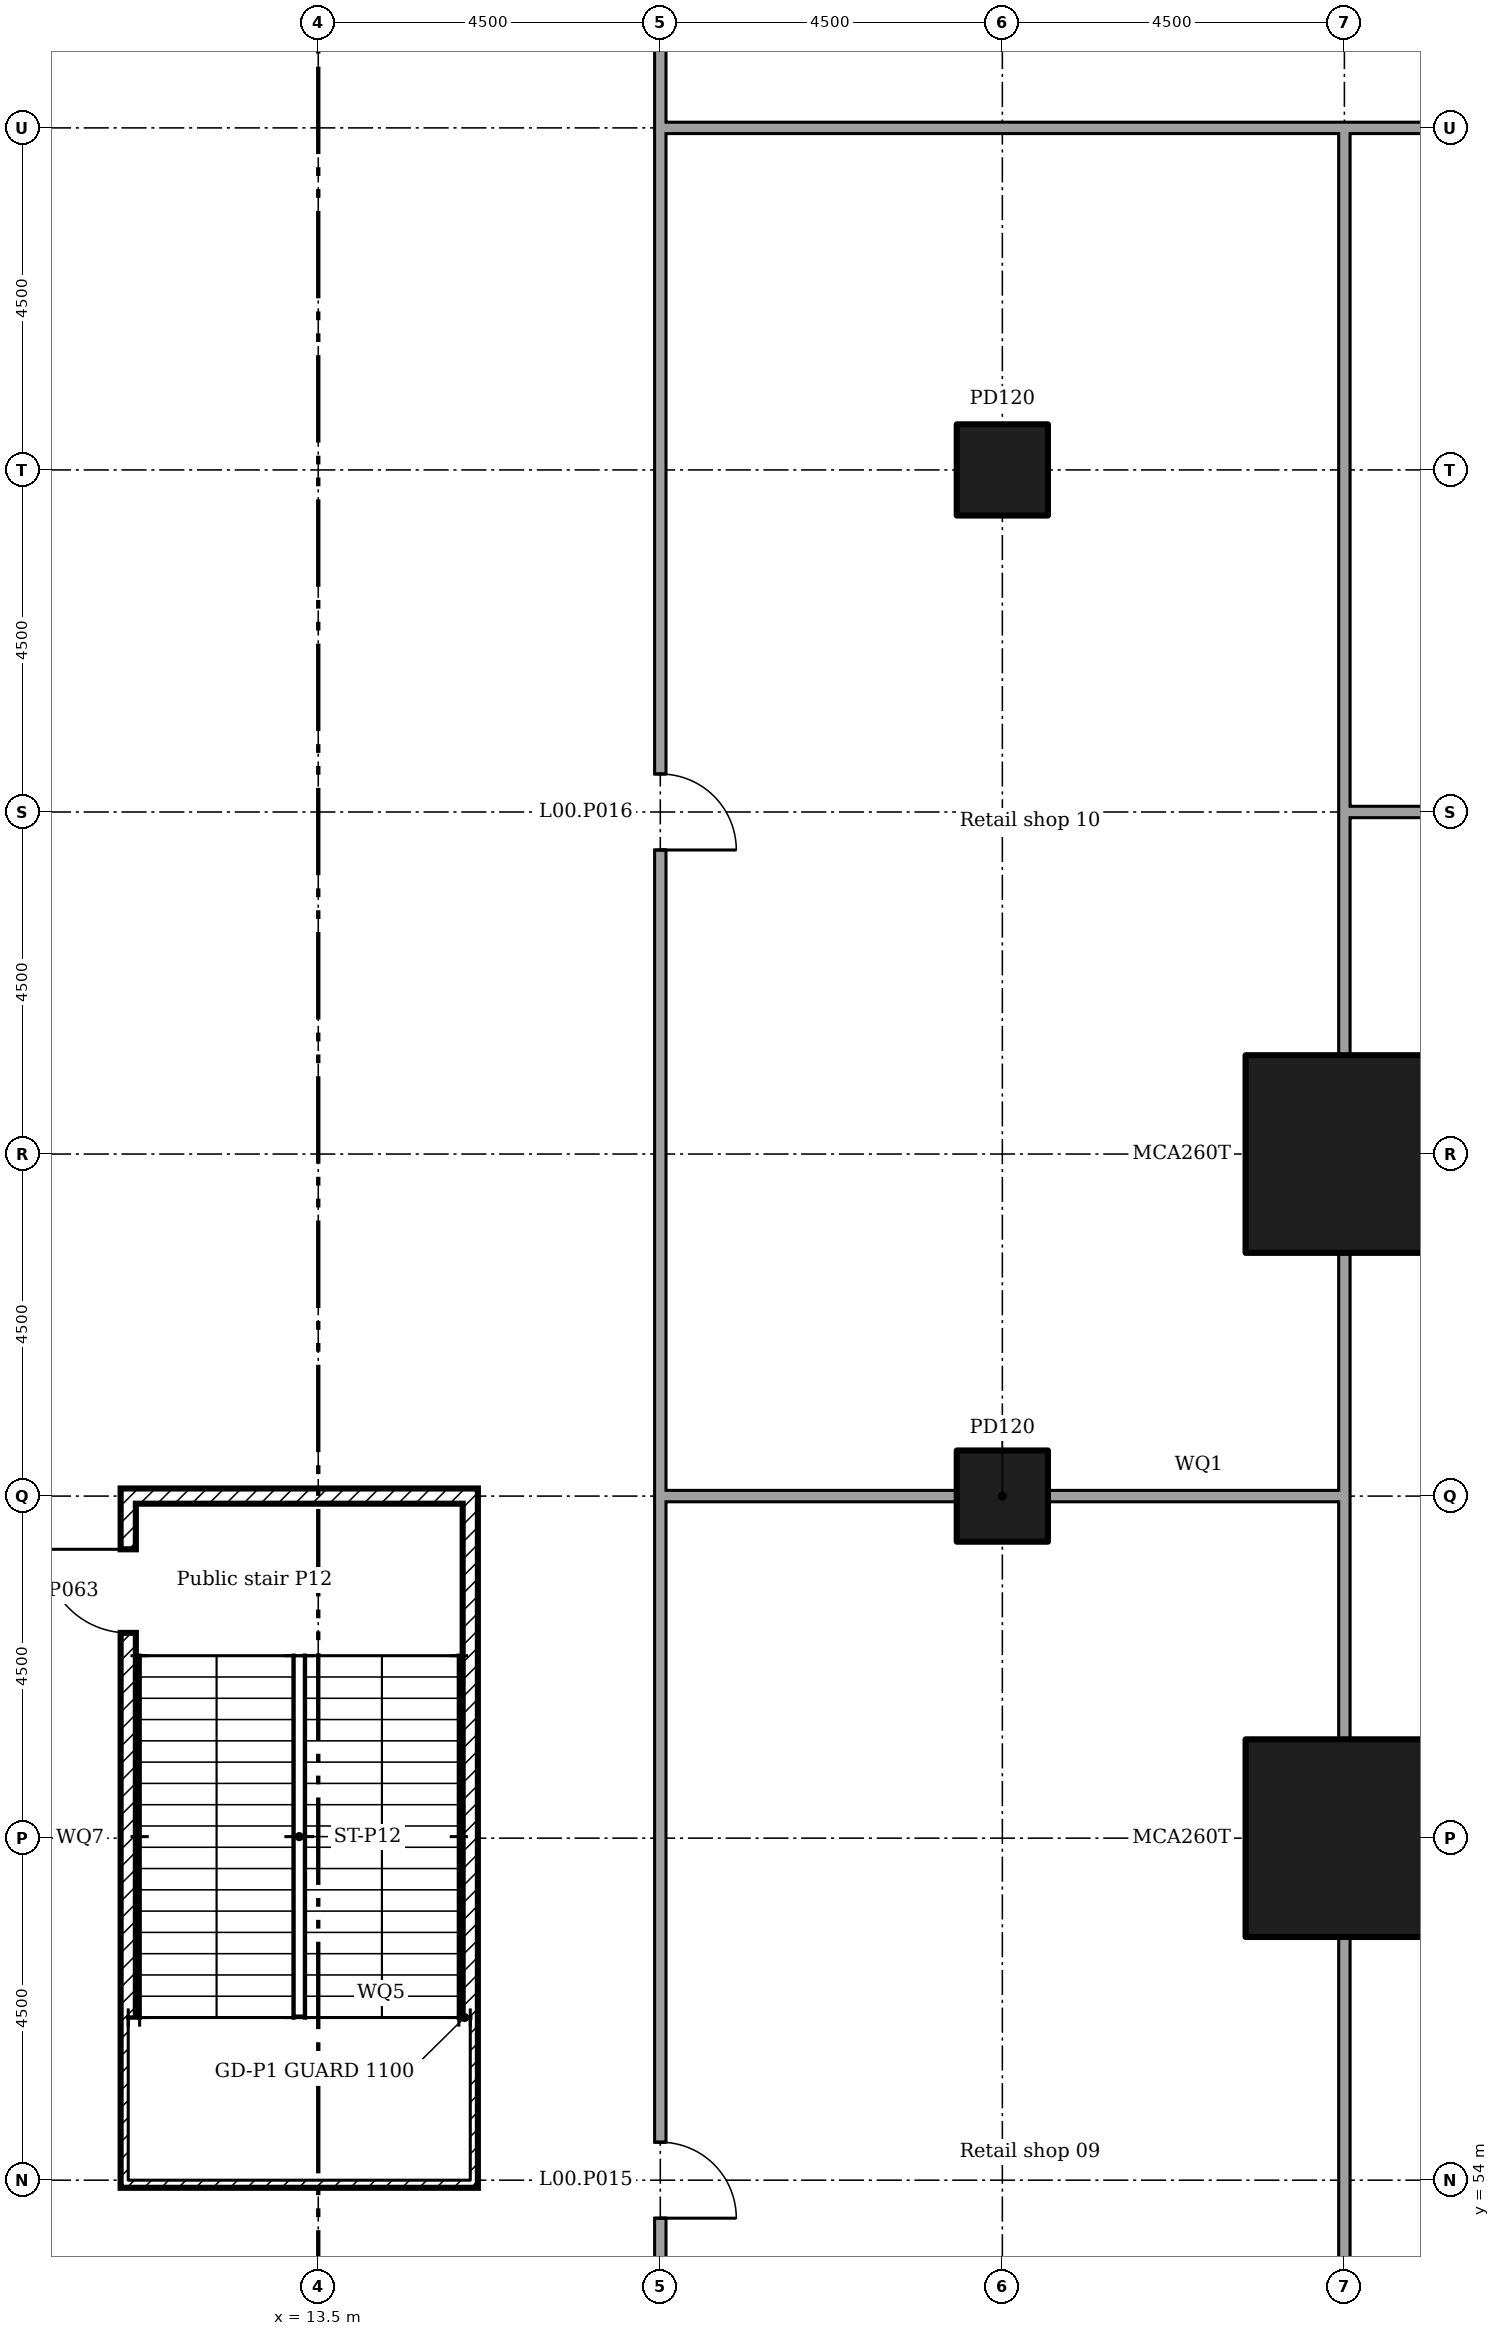
"""IFC4 building model, lengths in metres.
Left out: names, types, materials, properties, quantities, classifications, styles, units other than length and angle.
Written with IfcOpenShell. Run it as: python <this file> out.ifc"""

import sys

from ifc_helpers import new_model, si_unit, direction, frame, frame_2d, origin, origin_2d, place, context, subcontext, project, spatial, rectangle, extrude, element, fill, save


model = new_model("IFC4")
c1 = context("Model", 3, precision=1e-05, world=origin(), true_north=direction((0.0, 1.0)))
c2 = subcontext(c1, "Body", "Model", "MODEL_VIEW")
j1 = project(units=[si_unit("LENGTHUNIT", "METRE"), si_unit("PLANEANGLEUNIT", "RADIAN")], contexts=[c1])
p1 = place(None, origin())
s1 = spatial("IfcSite", under=j1, at=p1, CompositionType="ELEMENT")
p2 = place(p1, origin())
s2 = spatial("IfcBuilding", under=s1, at=p2, CompositionType="ELEMENT")
p3 = place(p2, origin())
s3 = spatial("IfcBuildingStorey", under=s2, at=p3, CompositionType="ELEMENT", Elevation=0.0)
for number, where in (
    (1, (27.0, 58.5, 0.0)),
    (2, (27.0, 67.5, 0.0)),
):
    element("IfcColumn", number, at=place(p3, frame(where)), inside=s3, PredefinedType="COLUMN", context=c2, shape_type="SweptSolid", body=[
        extrude(rectangle(XDim=2.6, YDim=2.6, at=origin_2d()), origin(), (0.0, 0.0, 1.0), 6.0),
    ])
for number, where in (
    (3, (22.5, 63.0, 0.0)),
    (4, (22.5, 76.5, 0.0)),
):
    element("IfcColumn", number, at=place(p3, frame(where)), inside=s3, PredefinedType="COLUMN", context=c2, shape_type="SweptSolid", body=[
        extrude(rectangle(XDim=1.2, YDim=1.2, at=origin_2d()), origin(), (0.0, 0.0, 1.0), 6.0),
    ])
p4 = place(p3, frame((18.0, 80.925, 0.0), z_axis=(0.0, 0.0, 1.0), x_axis=(0.0, 1.0, 0.0)))
e5 = element("IfcWall", 5, at=p4, inside=s3, PredefinedType="PARTITIONING", context=c2, shape_type="SweptSolid", body=[
    extrude(rectangle(XDim=9.15, YDim=0.15, at=frame_2d((4.575, 0.0))), origin(), (0.0, 0.0, 1.0), 5.55),
])
p5 = place(p4, frame((3.675, 0.0, 0.0)))
e6 = element("IfcOpeningElement", 6, at=p5, cuts=e5, PredefinedType="OPENING", context=c2, shape_type="SweptSolid", body=[
    extrude(rectangle(XDim=1.8, YDim=2.1, at=frame_2d((0.9, 1.05))), frame((0.0, 0.085, 0.0), z_axis=(0.0, -1.0, 0.0), x_axis=(1.0, 0.0, 0.0)), (0.0, 0.0, 1.0), 0.17),
])
p6 = place(p3, frame((18.0, 45.0, 0.0), z_axis=(0.0, 0.0, 1.0), x_axis=(0.0, 1.0, 0.0)))
e7 = element("IfcWall", 7, at=p6, inside=s3, PredefinedType="PARTITIONING", context=c2, shape_type="SweptSolid", body=[
    extrude(rectangle(XDim=18.075, YDim=0.15, at=frame_2d((9.038, 0.0))), origin(), (0.0, 0.0, 1.0), 5.55),
])
p7 = place(p6, frame((8.5, 0.0, 0.0)))
e8 = element("IfcOpeningElement", 8, at=p7, cuts=e7, PredefinedType="OPENING", context=c2, shape_type="SweptSolid", body=[
    extrude(rectangle(XDim=1.0, YDim=2.1, at=frame_2d((0.5, 1.05))), frame((0.0, 0.085, 0.0), z_axis=(0.0, -1.0, 0.0), x_axis=(1.0, 0.0, 0.0)), (0.0, 0.0, 1.0), 0.17),
])
p8 = place(p3, frame((18.0, 63.0, 0.0), z_axis=(0.0, 0.0, 1.0), x_axis=(0.0, 1.0, 0.0)))
e9 = element("IfcWall", 9, at=p8, inside=s3, PredefinedType="PARTITIONING", context=c2, shape_type="SweptSolid", body=[
    extrude(rectangle(XDim=18.0, YDim=0.15, at=frame_2d((9.0, 0.0))), origin(), (0.0, 0.0, 1.0), 5.55),
])
p9 = place(p8, frame((8.5, 0.0, 0.0)))
e10 = element("IfcOpeningElement", 10, at=p9, cuts=e9, PredefinedType="OPENING", context=c2, shape_type="SweptSolid", body=[
    extrude(rectangle(XDim=1.0, YDim=2.1, at=frame_2d((0.5, 1.05))), frame((0.0, 0.085, 0.0), z_axis=(0.0, -1.0, 0.0), x_axis=(1.0, 0.0, 0.0)), (0.0, 0.0, 1.0), 0.17),
])
p10 = place(p3, frame((11.0, 53.9, 0.0), z_axis=(0.0, 0.0, 1.0), x_axis=(0.0, 1.0, 0.0)))
e11 = element("IfcWall", 11, at=p10, inside=s3, PredefinedType="SOLIDWALL", context=c2, shape_type="SweptSolid", body=[
    extrude(rectangle(XDim=9.2, YDim=0.2, at=frame_2d((4.6, 0.0))), origin(), (0.0, 0.0, 1.0), 5.55),
])
p11 = place(p10, frame((7.3, 0.0, 0.0)))
e12 = element("IfcOpeningElement", 12, at=p11, cuts=e11, PredefinedType="OPENING", context=c2, shape_type="SweptSolid", body=[
    extrude(rectangle(XDim=1.1, YDim=2.1, at=frame_2d((0.55, 1.05))), frame((0.0, 0.11, 0.0), z_axis=(0.0, -1.0, 0.0), x_axis=(1.0, 0.0, 0.0)), (0.0, 0.0, 1.0), 0.22),
])
p12 = place(p3, frame((15.5, 53.9, 0.0), z_axis=(0.0, 0.0, 1.0), x_axis=(0.0, 1.0, 0.0)))
e13 = element("IfcWall", 13, at=p12, inside=s3, PredefinedType="SOLIDWALL", context=c2, shape_type="SweptSolid", body=[
    extrude(rectangle(XDim=9.2, YDim=0.2, at=frame_2d((4.6, 0.0))), origin(), (0.0, 0.0, 1.0), 5.55),
])
for number, where in (
    (14, (11.1, 54.0, 0.0)),
    (15, (11.1, 63.0, 0.0)),
):
    element("IfcWall", number, at=place(p3, frame(where)), inside=s3, PredefinedType="SOLIDWALL", context=c2, shape_type="SweptSolid", body=[
        extrude(rectangle(XDim=4.3, YDim=0.2, at=frame_2d((2.15, 0.0))), origin(), (0.0, 0.0, 1.0), 5.55),
    ])
p13 = place(p3, frame((18.075, 81.0, 0.0)))
e16 = element("IfcWall", 16, at=p13, inside=s3, PredefinedType="PARTITIONING", context=c2, shape_type="SweptSolid", body=[
    extrude(rectangle(XDim=9.0, YDim=0.15, at=frame_2d((4.5, 0.0))), origin(), (0.0, 0.0, 1.0), 5.55),
])
p14 = place(p3, frame((27.0, 81.0, 0.0)))
e17 = element("IfcWall", 17, at=p14, inside=s3, PredefinedType="PARTITIONING", context=c2, shape_type="SweptSolid", body=[
    extrude(rectangle(XDim=15.075, YDim=0.15, at=frame_2d((7.538, 0.0))), origin(), (0.0, 0.0, 1.0), 5.55),
])
p15 = place(p14, frame((7.0, 0.0, 0.0)))
e18 = element("IfcOpeningElement", 18, at=p15, cuts=e17, PredefinedType="OPENING", context=c2, shape_type="SweptSolid", body=[
    extrude(rectangle(XDim=1.0, YDim=2.1, at=frame_2d((0.5, 1.05))), frame((0.0, 0.085, 0.0), z_axis=(0.0, -1.0, 0.0), x_axis=(1.0, 0.0, 0.0)), (0.0, 0.0, 1.0), 0.17),
])
p16 = place(p3, frame((18.075, 63.0, 0.0)))
e19 = element("IfcWall", 19, at=p16, inside=s3, PredefinedType="PARTITIONING", context=c2, shape_type="SweptSolid", body=[
    extrude(rectangle(XDim=3.83, YDim=0.15, at=frame_2d((1.915, 0.0))), origin(), (0.0, 0.0, 1.0), 5.55),
])
p17 = place(p3, frame((23.095, 63.0, 0.0)))
e20 = element("IfcWall", 20, at=p17, inside=s3, PredefinedType="PARTITIONING", context=c2, shape_type="SweptSolid", body=[
    extrude(rectangle(XDim=3.98, YDim=0.15, at=frame_2d((1.99, 0.0))), origin(), (0.0, 0.0, 1.0), 5.55),
])
p18 = place(p3, frame((27.0, 46.295, 0.0), z_axis=(0.0, 0.0, 1.0), x_axis=(0.0, 1.0, 0.0)))
e21 = element("IfcWall", 21, at=p18, inside=s3, PredefinedType="PARTITIONING", context=c2, shape_type="SweptSolid", body=[
    extrude(rectangle(XDim=10.91, YDim=0.15, at=frame_2d((5.455, 0.0))), origin(), (0.0, 0.0, 1.0), 5.55),
])
p19 = place(p3, frame((27.0, 59.795, 0.0), z_axis=(0.0, 0.0, 1.0), x_axis=(0.0, 1.0, 0.0)))
e22 = element("IfcWall", 22, at=p19, inside=s3, PredefinedType="PARTITIONING", context=c2, shape_type="SweptSolid", body=[
    extrude(rectangle(XDim=3.13, YDim=0.15, at=frame_2d((1.565, 0.0))), origin(), (0.0, 0.0, 1.0), 5.55),
])
p20 = place(p3, frame((27.0, 71.925, 0.0), z_axis=(0.0, 0.0, 1.0), x_axis=(0.0, 1.0, 0.0)))
e23 = element("IfcWall", 23, at=p20, inside=s3, PredefinedType="PARTITIONING", context=c2, shape_type="SweptSolid", body=[
    extrude(rectangle(XDim=9.0, YDim=0.15, at=frame_2d((4.5, 0.0))), origin(), (0.0, 0.0, 1.0), 5.55),
])
for number, where, z_axis, x_axis in (
    (24, (27.0, 63.0, 0.0), (0.0, 0.0, 1.0), (0.0, 1.0, 0.0)),
    (25, (27.0, 68.795, 0.0), (0.0, 0.0, 1.0), (0.0, 1.0, 0.0)),
):
    element("IfcWall", number, at=place(p3, frame(where, z_axis=z_axis, x_axis=x_axis)), inside=s3, PredefinedType="PARTITIONING", context=c2, shape_type="SweptSolid", body=[
        extrude(rectangle(XDim=3.205, YDim=0.15, at=frame_2d((1.603, 0.0))), origin(), (0.0, 0.0, 1.0), 5.55),
    ])
p21 = place(p3, frame((27.075, 72.0, 0.0)))
e26 = element("IfcWall", 26, at=p21, inside=s3, PredefinedType="PARTITIONING", context=c2, shape_type="SweptSolid", body=[
    extrude(rectangle(XDim=3.13, YDim=0.15, at=frame_2d((1.565, 0.0))), origin(), (0.0, 0.0, 1.0), 5.55),
])
for number, where, z_axis, x_axis in (
    (27, (15.4, 56.04, 0.0), (0.0, 0.0, 1.0), (-1.0, 0.0, 0.0)),
    (28, (15.4, 54.7, 0.0), (0.0, 0.0, 1.0), (-1.0, 0.0, 0.0)),
):
    element("IfcWall", number, at=place(p3, frame(where, z_axis=z_axis, x_axis=x_axis)), inside=s3, PredefinedType="SOLIDWALL", context=c2, shape_type="SweptSolid", body=[
        extrude(rectangle(XDim=4.3, YDim=0.2, at=frame_2d((2.15, 0.0))), origin(), (0.0, 0.0, 1.0), 2.8),
    ])
p22 = place(p7, frame((1.0, 0.0, 0.0), x_axis=(-1.0, 0.0, 0.0)))
e29 = element("IfcDoor", 29, at=p22, inside=s3, OperationType="SINGLE_SWING_LEFT", PredefinedType="DOOR", context=c2, shape_type="SweptSolid", body=[
    extrude(rectangle(XDim=1.0, YDim=2.1, at=frame_2d((0.5, 1.05))), frame((0.0, 0.025, 0.0), z_axis=(0.0, -1.0, 0.0), x_axis=(1.0, 0.0, 0.0)), (0.0, 0.0, 1.0), 0.05),
])
fill(e8, e29)
p23 = place(p9, frame((1.0, 0.0, 0.0), x_axis=(-1.0, 0.0, 0.0)))
e30 = element("IfcDoor", 30, at=p23, inside=s3, OperationType="SINGLE_SWING_LEFT", PredefinedType="DOOR", context=c2, shape_type="SweptSolid", body=[
    extrude(rectangle(XDim=1.0, YDim=2.1, at=frame_2d((0.5, 1.05))), frame((0.0, 0.025, 0.0), z_axis=(0.0, -1.0, 0.0), x_axis=(1.0, 0.0, 0.0)), (0.0, 0.0, 1.0), 0.05),
])
fill(e10, e30)
p24 = place(p11, origin())
e31 = element("IfcDoor", 31, at=p24, inside=s3, OperationType="SINGLE_SWING_LEFT", PredefinedType="DOOR", context=c2, shape_type="SweptSolid", body=[
    extrude(rectangle(XDim=1.1, YDim=2.1, at=frame_2d((0.55, 1.05))), frame((0.0, 0.025, 0.0), z_axis=(0.0, -1.0, 0.0), x_axis=(1.0, 0.0, 0.0)), (0.0, 0.0, 1.0), 0.05),
])
fill(e12, e31)
save(model, sys.argv[1])
